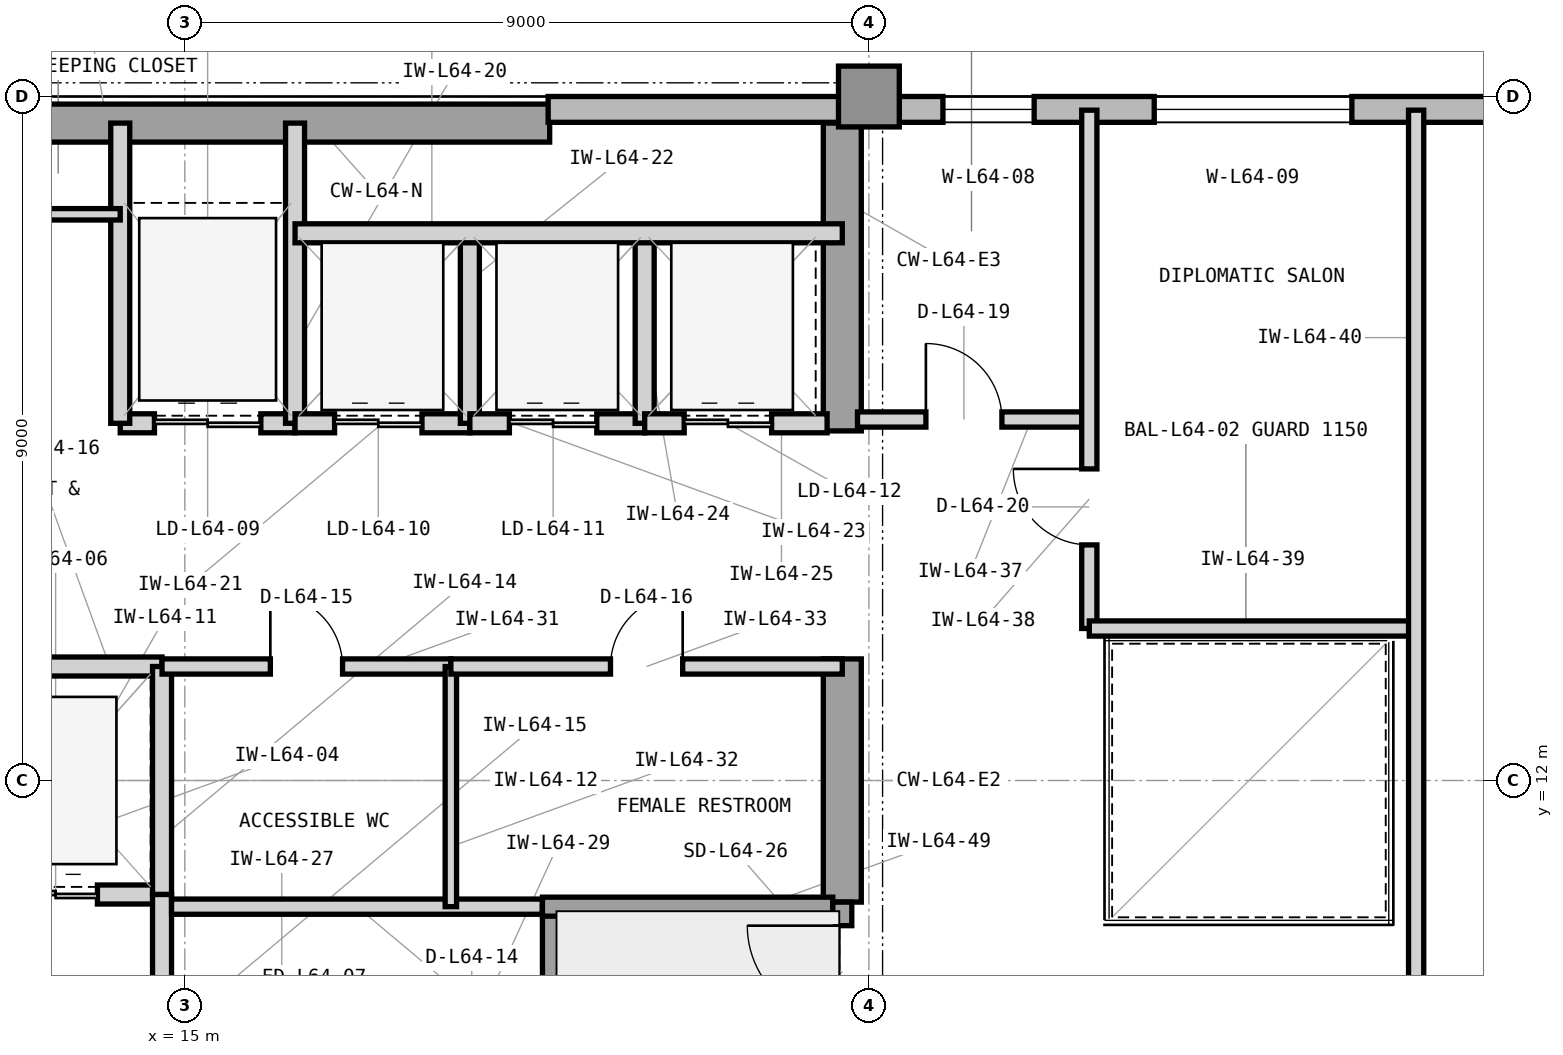
"""IFC4 building model, lengths in metres.
Left out: names, types, materials, properties, quantities, classifications, styles, units other than length and angle.
Written with IfcOpenShell. Run it as: python <this file> out.ifc"""

import sys

from ifc_helpers import new_model, si_unit, direction, frame, frame_2d, origin, origin_2d, place, context, subcontext, project, spatial, rectangle, extrude, element, fill, save


model = new_model("IFC4")
c1 = context("Model", 3, precision=1e-05, world=origin(), true_north=direction((0.0, 1.0)))
c2 = subcontext(c1, "Body", "Model", "MODEL_VIEW")
j1 = project(units=[si_unit("LENGTHUNIT", "METRE"), si_unit("PLANEANGLEUNIT", "RADIAN")], contexts=[c1])
p1 = place(None, origin())
s1 = spatial("IfcSite", under=j1, at=p1, CompositionType="ELEMENT")
p2 = place(p1, origin())
s2 = spatial("IfcBuilding", under=s1, at=p2, CompositionType="ELEMENT")
p3 = place(p2, frame((0.0, 0.0, 262.5)))
s3 = spatial("IfcBuildingStorey", under=s2, at=p3, CompositionType="ELEMENT", Elevation=262.5)
p4 = place(p3, frame((7.475, 20.65, 0.0), z_axis=(0.0, 0.0, 1.0), x_axis=(1.0, 0.0, 0.0)))
e1 = element("IfcWall", 1, at=p4, inside=s3, PredefinedType="SHEAR", context=c2, shape_type="SweptSolid", body=[
    extrude(rectangle(XDim=12.325, YDim=0.5, at=frame_2d((6.163, 0.0))), origin(), (0.0, 0.0, 1.0), 3.9),
])
p5 = place(p3, frame((23.65, 10.4, 0.0), z_axis=(0.0, 0.0, 1.0), x_axis=(0.0, 1.0, 0.0)))
e2 = element("IfcWall", 2, at=p5, inside=s3, PredefinedType="SHEAR", context=c2, shape_type="SweptSolid", body=[
    extrude(rectangle(XDim=3.2, YDim=0.5, at=frame_2d((1.6, 0.0))), origin(), (0.0, 0.0, 1.0), 3.9),
])
p6 = place(p3, frame((23.65, 16.6, 0.0), z_axis=(0.0, 0.0, 1.0), x_axis=(0.0, 1.0, 0.0)))
e3 = element("IfcWall", 3, at=p6, inside=s3, PredefinedType="SHEAR", context=c2, shape_type="SweptSolid", body=[
    extrude(rectangle(XDim=4.05, YDim=0.5, at=frame_2d((2.025, 0.0))), origin(), (0.0, 0.0, 1.0), 3.9),
])
p7 = place(p3, frame((24.0, 21.0, 0.0), z_axis=(0.0, 0.0, 1.0), x_axis=(1.0, 0.0, 0.0)))
e4 = element("IfcColumn", 4, at=p7, inside=s3, PredefinedType="COLUMN", context=c2, shape_type="SweptSolid", body=[
    extrude(rectangle(XDim=0.8, YDim=0.8, at=origin_2d()), origin(), (0.0, 0.0, 1.0), 3.9),
])
p8 = place(p3, frame((52.4, 20.83, 0.0), z_axis=(0.0, 0.0, 1.0), x_axis=(-1.0, 0.0, 0.0)))
e5 = element("IfcWall", 5, at=p8, inside=s3, PredefinedType="STANDARD", context=c2, shape_type="SweptSolid", body=[
    extrude(rectangle(XDim=32.62, YDim=0.34, at=frame_2d((16.31, 0.0))), origin(), (0.0, 0.0, 1.0), 3.715),
])
p9 = place(p8, frame((5.69, 0.0, 0.8)))
e6 = element("IfcOpeningElement", 6, at=p9, cuts=e5, PredefinedType="OPENING", context=c2, shape_type="SweptSolid", body=[
    extrude(rectangle(XDim=2.6, YDim=2.35, at=frame_2d((1.3, 1.175))), frame((0.0, 0.18, 0.0), z_axis=(0.0, -1.0, 0.0), x_axis=(1.0, 0.0, 0.0)), (0.0, 0.0, 1.0), 0.36),
])
p10 = place(p8, frame((15.01, 0.0, 0.8)))
e7 = element("IfcOpeningElement", 7, at=p10, cuts=e5, PredefinedType="OPENING", context=c2, shape_type="SweptSolid", body=[
    extrude(rectangle(XDim=2.6, YDim=2.35, at=frame_2d((1.3, 1.175))), frame((0.0, 0.18, 0.0), z_axis=(0.0, -1.0, 0.0), x_axis=(1.0, 0.0, 0.0)), (0.0, 0.0, 1.0), 0.36),
])
p11 = place(p8, frame((26.226, 0.0, 0.8)))
e8 = element("IfcOpeningElement", 8, at=p11, cuts=e5, PredefinedType="OPENING", context=c2, shape_type="SweptSolid", body=[
    extrude(rectangle(XDim=1.2, YDim=2.35, at=frame_2d((0.6, 1.175))), frame((0.0, 0.18, 0.0), z_axis=(0.0, -1.0, 0.0), x_axis=(1.0, 0.0, 0.0)), (0.0, 0.0, 1.0), 0.36),
])
p12 = place(p8, frame((22.046, 0.0, 0.8)))
e9 = element("IfcOpeningElement", 9, at=p12, cuts=e5, PredefinedType="OPENING", context=c2, shape_type="SweptSolid", body=[
    extrude(rectangle(XDim=2.6, YDim=2.35, at=frame_2d((1.3, 1.175))), frame((0.0, 0.18, 0.0), z_axis=(0.0, -1.0, 0.0), x_axis=(1.0, 0.0, 0.0)), (0.0, 0.0, 1.0), 0.36),
])
p13 = place(p3, frame((11.95, 10.5, 0.0), z_axis=(0.0, 0.0, 1.0), x_axis=(1.0, 0.0, 0.0)))
e10 = element("IfcWall", 10, at=p13, inside=s3, PredefinedType="PARTITIONING", context=c2, shape_type="SweptSolid", body=[
    extrude(rectangle(XDim=2.75, YDim=0.25, at=frame_2d((1.375, 0.0))), origin(), (0.0, 0.0, 1.0), 3.088),
])
p14 = place(p13, frame((0.8, 0.0, 0.0)))
e11 = element("IfcOpeningElement", 11, at=p14, cuts=e10, PredefinedType="OPENING", context=c2, shape_type="SweptSolid", body=[
    extrude(rectangle(XDim=1.1, YDim=2.25, at=frame_2d((0.55, 1.125))), frame((0.0, 0.135, 0.0), z_axis=(0.0, -1.0, 0.0), x_axis=(1.0, 0.0, 0.0)), (0.0, 0.0, 1.0), 0.27),
])
p15 = place(p3, frame((11.95, 13.5, 0.0), z_axis=(0.0, 0.0, 1.0), x_axis=(1.0, 0.0, 0.0)))
e12 = element("IfcWall", 12, at=p15, inside=s3, PredefinedType="PARTITIONING", context=c2, shape_type="SweptSolid", body=[
    extrude(rectangle(XDim=2.75, YDim=0.25, at=frame_2d((1.375, 0.0))), origin(), (0.0, 0.0, 1.0), 3.088),
])
p16 = place(p3, frame((14.7, 10.5, 0.0), z_axis=(0.0, 0.0, 1.0), x_axis=(0.0, 1.0, 0.0)))
e13 = element("IfcWall", 13, at=p16, inside=s3, PredefinedType="PARTITIONING", context=c2, shape_type="SweptSolid", body=[
    extrude(rectangle(XDim=3.0, YDim=0.25, at=frame_2d((1.5, 0.0))), origin(), (0.0, 0.0, 1.0), 3.705),
])
p17 = place(p3, frame((14.7, 6.7, 0.0), z_axis=(0.0, 0.0, 1.0), x_axis=(0.0, 1.0, 0.0)))
e14 = element("IfcWall", 14, at=p17, inside=s3, PredefinedType="PARTITIONING", context=c2, shape_type="SweptSolid", body=[
    extrude(rectangle(XDim=3.8, YDim=0.25, at=frame_2d((1.9, 0.0))), origin(), (0.0, 0.0, 1.0), 3.705),
])
p18 = place(p17, frame((1.3, 0.0, 0.0)))
e15 = element("IfcOpeningElement", 15, at=p18, cuts=e14, PredefinedType="OPENING", context=c2, shape_type="SweptSolid", body=[
    extrude(rectangle(XDim=1.2, YDim=2.2, at=frame_2d((0.6, 1.1))), frame((0.0, 0.135, 0.0), z_axis=(0.0, -1.0, 0.0), x_axis=(1.0, 0.0, 0.0)), (0.0, 0.0, 1.0), 0.27),
])
p19 = place(p3, frame((14.15, 16.7, 0.0), z_axis=(0.0, 0.0, 1.0), x_axis=(1.0, 0.0, 0.0)))
e16 = element("IfcWall", 16, at=p19, inside=s3, PredefinedType="PARTITIONING", context=c2, shape_type="SweptSolid", body=[
    extrude(rectangle(XDim=2.3, YDim=0.25, at=frame_2d((1.15, 0.0))), origin(), (0.0, 0.0, 1.0), 3.088),
])
p20 = place(p19, frame((0.45, 0.0, 0.0)))
e17 = element("IfcOpeningElement", 17, at=p20, cuts=e16, PredefinedType="OPENING", context=c2, shape_type="SweptSolid", body=[
    extrude(rectangle(XDim=1.4, YDim=2.35, at=frame_2d((0.7, 1.175))), frame((0.0, 0.135, 0.0), z_axis=(0.0, -1.0, 0.0), x_axis=(1.0, 0.0, 0.0)), (0.0, 0.0, 1.0), 0.27),
])
for number, where, z_axis, x_axis in (
    (18, (14.15, 16.7, 0.0), (0.0, 0.0, 1.0), (0.0, 1.0, 0.0)),
    (19, (16.45, 16.7, 0.0), (0.0, 0.0, 1.0), (0.0, 1.0, 0.0)),
):
    element("IfcWall", number, at=place(p3, frame(where, z_axis=z_axis, x_axis=x_axis)), inside=s3, PredefinedType="PARTITIONING", context=c2, shape_type="SweptSolid", body=[
        extrude(rectangle(XDim=3.95, YDim=0.25, at=frame_2d((1.975, 0.0))), origin(), (0.0, 0.0, 1.0), 3.705),
    ])
p21 = place(p3, frame((16.45, 16.7, 0.0), z_axis=(0.0, 0.0, 1.0), x_axis=(1.0, 0.0, 0.0)))
e20 = element("IfcWall", 20, at=p21, inside=s3, PredefinedType="PARTITIONING", context=c2, shape_type="SweptSolid", body=[
    extrude(rectangle(XDim=2.3, YDim=0.25, at=frame_2d((1.15, 0.0))), origin(), (0.0, 0.0, 1.0), 3.088),
])
p22 = place(p21, frame((0.52, 0.0, 0.0)))
e21 = element("IfcOpeningElement", 21, at=p22, cuts=e20, PredefinedType="OPENING", context=c2, shape_type="SweptSolid", body=[
    extrude(rectangle(XDim=1.15, YDim=2.25, at=frame_2d((0.575, 1.125))), frame((0.0, 0.135, 0.0), z_axis=(0.0, -1.0, 0.0), x_axis=(1.0, 0.0, 0.0)), (0.0, 0.0, 1.0), 0.27),
])
p23 = place(p3, frame((18.75, 16.7, 0.0), z_axis=(0.0, 0.0, 1.0), x_axis=(0.0, 1.0, 0.0)))
e22 = element("IfcWall", 22, at=p23, inside=s3, PredefinedType="PARTITIONING", context=c2, shape_type="SweptSolid", body=[
    extrude(rectangle(XDim=2.5, YDim=0.25, at=frame_2d((1.25, 0.0))), origin(), (0.0, 0.0, 1.0), 3.705),
])
p24 = place(p3, frame((18.75, 16.7, 0.0), z_axis=(0.0, 0.0, 1.0), x_axis=(1.0, 0.0, 0.0)))
e23 = element("IfcWall", 23, at=p24, inside=s3, PredefinedType="PARTITIONING", context=c2, shape_type="SweptSolid", body=[
    extrude(rectangle(XDim=2.3, YDim=0.25, at=frame_2d((1.15, 0.0))), origin(), (0.0, 0.0, 1.0), 3.088),
])
p25 = place(p24, frame((0.52, 0.0, 0.0)))
e24 = element("IfcOpeningElement", 24, at=p25, cuts=e23, PredefinedType="OPENING", context=c2, shape_type="SweptSolid", body=[
    extrude(rectangle(XDim=1.15, YDim=2.25, at=frame_2d((0.575, 1.125))), frame((0.0, 0.135, 0.0), z_axis=(0.0, -1.0, 0.0), x_axis=(1.0, 0.0, 0.0)), (0.0, 0.0, 1.0), 0.27),
])
p26 = place(p3, frame((21.05, 16.7, 0.0), z_axis=(0.0, 0.0, 1.0), x_axis=(0.0, 1.0, 0.0)))
e25 = element("IfcWall", 25, at=p26, inside=s3, PredefinedType="PARTITIONING", context=c2, shape_type="SweptSolid", body=[
    extrude(rectangle(XDim=2.5, YDim=0.25, at=frame_2d((1.25, 0.0))), origin(), (0.0, 0.0, 1.0), 3.705),
])
p27 = place(p3, frame((21.05, 16.7, 0.0), z_axis=(0.0, 0.0, 1.0), x_axis=(1.0, 0.0, 0.0)))
e26 = element("IfcWall", 26, at=p27, inside=s3, PredefinedType="PARTITIONING", context=c2, shape_type="SweptSolid", body=[
    extrude(rectangle(XDim=2.4, YDim=0.25, at=frame_2d((1.2, 0.0))), origin(), (0.0, 0.0, 1.0), 3.088),
])
p28 = place(p27, frame((0.52, 0.0, 0.0)))
e27 = element("IfcOpeningElement", 27, at=p28, cuts=e26, PredefinedType="OPENING", context=c2, shape_type="SweptSolid", body=[
    extrude(rectangle(XDim=1.15, YDim=2.25, at=frame_2d((0.575, 1.125))), frame((0.0, 0.135, 0.0), z_axis=(0.0, -1.0, 0.0), x_axis=(1.0, 0.0, 0.0)), (0.0, 0.0, 1.0), 0.27),
])
p29 = place(p3, frame((16.45, 19.2, 0.0), z_axis=(0.0, 0.0, 1.0), x_axis=(1.0, 0.0, 0.0)))
e28 = element("IfcWall", 28, at=p29, inside=s3, PredefinedType="PARTITIONING", context=c2, shape_type="SweptSolid", body=[
    extrude(rectangle(XDim=7.2, YDim=0.25, at=frame_2d((3.6, 0.0))), origin(), (0.0, 0.0, 1.0), 3.705),
])
p30 = place(p3, frame((14.825, 10.34, 0.0), z_axis=(0.0, 0.0, 1.0), x_axis=(1.0, 0.0, 0.0)))
e29 = element("IfcWall", 29, at=p30, inside=s3, PredefinedType="PARTITIONING", context=c2, shape_type="SweptSolid", body=[
    extrude(rectangle(XDim=4.88, YDim=0.2, at=frame_2d((2.44, 0.0))), origin(), (0.0, 0.0, 1.0), 3.088),
])
p31 = place(p3, frame((14.7, 13.5, 0.0), z_axis=(0.0, 0.0, 1.0), x_axis=(1.0, 0.0, 0.0)))
e30 = element("IfcWall", 30, at=p31, inside=s3, PredefinedType="PARTITIONING", context=c2, shape_type="SweptSolid", body=[
    extrude(rectangle(XDim=3.8, YDim=0.2, at=frame_2d((1.9, 0.0))), origin(), (0.0, 0.0, 1.0), 3.088),
])
p32 = place(p31, frame((1.425, 0.0, 0.0)))
e31 = element("IfcOpeningElement", 31, at=p32, cuts=e30, PredefinedType="OPENING", context=c2, shape_type="SweptSolid", body=[
    extrude(rectangle(XDim=0.95, YDim=2.1, at=frame_2d((0.475, 1.05))), frame((0.0, 0.11, 0.0), z_axis=(0.0, -1.0, 0.0), x_axis=(1.0, 0.0, 0.0)), (0.0, 0.0, 1.0), 0.22),
])
p33 = place(p3, frame((18.5, 10.34, 0.0), z_axis=(0.0, 0.0, 1.0), x_axis=(0.0, 1.0, 0.0)))
e32 = element("IfcWall", 32, at=p33, inside=s3, PredefinedType="PARTITIONING", context=c2, shape_type="SweptSolid", body=[
    extrude(rectangle(XDim=3.16, YDim=0.15, at=frame_2d((1.58, 0.0))), origin(), (0.0, 0.0, 1.0), 3.705),
])
p34 = place(p3, frame((18.5, 13.5, 0.0), z_axis=(0.0, 0.0, 1.0), x_axis=(1.0, 0.0, 0.0)))
e33 = element("IfcWall", 33, at=p34, inside=s3, PredefinedType="PARTITIONING", context=c2, shape_type="SweptSolid", body=[
    extrude(rectangle(XDim=5.15, YDim=0.2, at=frame_2d((2.575, 0.0))), origin(), (0.0, 0.0, 1.0), 3.088),
])
p35 = place(p34, frame((2.1, 0.0, 0.0)))
e34 = element("IfcOpeningElement", 34, at=p35, cuts=e33, PredefinedType="OPENING", context=c2, shape_type="SweptSolid", body=[
    extrude(rectangle(XDim=0.95, YDim=2.1, at=frame_2d((0.475, 1.05))), frame((0.0, 0.11, 0.0), z_axis=(0.0, -1.0, 0.0), x_axis=(1.0, 0.0, 0.0)), (0.0, 0.0, 1.0), 0.22),
])
p36 = place(p3, frame((10.33, 19.45, 0.0), z_axis=(0.0, 0.0, 1.0), x_axis=(1.0, 0.0, 0.0)))
e35 = element("IfcWall", 35, at=p36, inside=s3, PredefinedType="PARTITIONING", context=c2, shape_type="SweptSolid", body=[
    extrude(rectangle(XDim=3.82, YDim=0.15, at=frame_2d((1.91, 0.0))), origin(), (0.0, 0.0, 1.0), 3.705),
])
p37 = place(p36, frame((1.25, 0.0, 0.0)))
e36 = element("IfcOpeningElement", 36, at=p37, cuts=e35, PredefinedType="OPENING", context=c2, shape_type="SweptSolid", body=[
    extrude(rectangle(XDim=0.95, YDim=2.1, at=frame_2d((0.475, 1.05))), frame((0.0, 0.085, 0.0), z_axis=(0.0, -1.0, 0.0), x_axis=(1.0, 0.0, 0.0)), (0.0, 0.0, 1.0), 0.17),
])
p38 = place(p3, frame((23.85, 16.75, 0.0), z_axis=(0.0, 0.0, 1.0), x_axis=(1.0, 0.0, 0.0)))
e37 = element("IfcWall", 37, at=p38, inside=s3, PredefinedType="PARTITIONING", context=c2, shape_type="SweptSolid", body=[
    extrude(rectangle(XDim=3.05, YDim=0.2, at=frame_2d((1.525, 0.0))), origin(), (0.0, 0.0, 1.0), 3.705),
])
p39 = place(p38, frame((0.9, 0.0, 0.0)))
e38 = element("IfcOpeningElement", 38, at=p39, cuts=e37, PredefinedType="OPENING", context=c2, shape_type="SweptSolid", body=[
    extrude(rectangle(XDim=1.0, YDim=2.15, at=frame_2d((0.5, 1.075))), frame((0.0, 0.11, 0.0), z_axis=(0.0, -1.0, 0.0), x_axis=(1.0, 0.0, 0.0)), (0.0, 0.0, 1.0), 0.22),
])
p40 = place(p3, frame((26.9, 14.0, 0.0), z_axis=(0.0, 0.0, 1.0), x_axis=(0.0, 1.0, 0.0)))
e39 = element("IfcWall", 39, at=p40, inside=s3, PredefinedType="PARTITIONING", context=c2, shape_type="SweptSolid", body=[
    extrude(rectangle(XDim=6.82, YDim=0.2, at=frame_2d((3.41, 0.0))), origin(), (0.0, 0.0, 1.0), 3.705),
])
p41 = place(p40, frame((1.1, 0.0, 0.0)))
e40 = element("IfcOpeningElement", 40, at=p41, cuts=e39, PredefinedType="OPENING", context=c2, shape_type="SweptSolid", body=[
    extrude(rectangle(XDim=1.0, YDim=2.15, at=frame_2d((0.5, 1.075))), frame((0.0, 0.11, 0.0), z_axis=(0.0, -1.0, 0.0), x_axis=(1.0, 0.0, 0.0)), (0.0, 0.0, 1.0), 0.22),
])
p42 = place(p3, frame((26.9, 14.0, 0.0), z_axis=(0.0, 0.0, 1.0), x_axis=(1.0, 0.0, 0.0)))
e41 = element("IfcWall", 41, at=p42, inside=s3, PredefinedType="PARTITIONING", context=c2, shape_type="SweptSolid", body=[
    extrude(rectangle(XDim=4.3, YDim=0.2, at=frame_2d((2.15, 0.0))), origin(), (0.0, 0.0, 1.0), 3.705),
])
p43 = place(p3, frame((31.2, 8.85, 0.0), z_axis=(0.0, 0.0, 1.0), x_axis=(0.0, 1.0, 0.0)))
e42 = element("IfcWall", 42, at=p43, inside=s3, PredefinedType="PARTITIONING", context=c2, shape_type="SweptSolid", body=[
    extrude(rectangle(XDim=11.97, YDim=0.2, at=frame_2d((5.985, 0.0))), origin(), (0.0, 0.0, 1.0), 3.705),
])
p44 = place(p3, frame((19.83, 3.6, 0.0), z_axis=(0.0, 0.0, 1.0), x_axis=(0.0, 1.0, 0.0)))
e43 = element("IfcWall", 43, at=p44, inside=s3, PredefinedType="SHEAR", context=c2, shape_type="SweptSolid", body=[
    extrude(rectangle(XDim=6.74, YDim=0.25, at=frame_2d((3.37, 0.0))), origin(), (0.0, 0.0, 1.0), 3.9),
])
p45 = place(p3, frame((19.705, 10.34, 0.0), z_axis=(0.0, 0.0, 1.0), x_axis=(1.0, 0.0, 0.0)))
e44 = element("IfcWall", 44, at=p45, inside=s3, PredefinedType="SHEAR", context=c2, shape_type="SweptSolid", body=[
    extrude(rectangle(XDim=3.82, YDim=0.25, at=frame_2d((1.91, 0.0))), origin(), (0.0, 0.0, 1.0), 3.9),
])
p46 = place(p3, frame((23.65, 6.8, 0.0), z_axis=(0.0, 0.0, 1.0), x_axis=(0.0, 1.0, 0.0)))
e45 = element("IfcWall", 45, at=p46, inside=s3, PredefinedType="SHEAR", context=c2, shape_type="SweptSolid", body=[
    extrude(rectangle(XDim=3.6, YDim=0.25, at=frame_2d((1.8, 0.0))), origin(), (0.0, 0.0, 1.0), 3.9),
])
p47 = place(p46, frame((2.04, 0.0, 0.0)))
e46 = element("IfcOpeningElement", 46, at=p47, cuts=e45, PredefinedType="OPENING", context=c2, shape_type="SweptSolid", body=[
    extrude(rectangle(XDim=1.25, YDim=2.2, at=frame_2d((0.625, 1.1))), frame((0.0, 0.135, 0.0), z_axis=(0.0, -1.0, 0.0), x_axis=(1.0, 0.0, 0.0)), (0.0, 0.0, 1.0), 0.27),
])
p48 = place(p14, origin())
e47 = element("IfcDoor", 47, at=p48, inside=s3, OperationType="DOUBLE_DOOR_SLIDING", PredefinedType="DOOR", context=c2, shape_type="SweptSolid", body=[
    extrude(rectangle(XDim=1.1, YDim=2.25, at=frame_2d((0.55, 1.125))), frame((0.0, 0.025, 0.0), z_axis=(0.0, -1.0, 0.0), x_axis=(1.0, 0.0, 0.0)), (0.0, 0.0, 1.0), 0.05),
])
fill(e11, e47)
p49 = place(p20, origin())
e48 = element("IfcDoor", 48, at=p49, inside=s3, OperationType="DOUBLE_DOOR_SLIDING", PredefinedType="DOOR", context=c2, shape_type="SweptSolid", body=[
    extrude(rectangle(XDim=1.4, YDim=2.35, at=frame_2d((0.7, 1.175))), frame((0.0, 0.025, 0.0), z_axis=(0.0, -1.0, 0.0), x_axis=(1.0, 0.0, 0.0)), (0.0, 0.0, 1.0), 0.05),
])
fill(e17, e48)
p50 = place(p22, origin())
e49 = element("IfcDoor", 49, at=p50, inside=s3, OperationType="DOUBLE_DOOR_SLIDING", PredefinedType="DOOR", context=c2, shape_type="SweptSolid", body=[
    extrude(rectangle(XDim=1.15, YDim=2.25, at=frame_2d((0.575, 1.125))), frame((0.0, 0.025, 0.0), z_axis=(0.0, -1.0, 0.0), x_axis=(1.0, 0.0, 0.0)), (0.0, 0.0, 1.0), 0.05),
])
fill(e21, e49)
p51 = place(p25, origin())
e50 = element("IfcDoor", 50, at=p51, inside=s3, OperationType="DOUBLE_DOOR_SLIDING", PredefinedType="DOOR", context=c2, shape_type="SweptSolid", body=[
    extrude(rectangle(XDim=1.15, YDim=2.25, at=frame_2d((0.575, 1.125))), frame((0.0, 0.025, 0.0), z_axis=(0.0, -1.0, 0.0), x_axis=(1.0, 0.0, 0.0)), (0.0, 0.0, 1.0), 0.05),
])
fill(e24, e50)
p52 = place(p28, origin())
e51 = element("IfcDoor", 51, at=p52, inside=s3, OperationType="DOUBLE_DOOR_SLIDING", PredefinedType="DOOR", context=c2, shape_type="SweptSolid", body=[
    extrude(rectangle(XDim=1.15, YDim=2.25, at=frame_2d((0.575, 1.125))), frame((0.0, 0.025, 0.0), z_axis=(0.0, -1.0, 0.0), x_axis=(1.0, 0.0, 0.0)), (0.0, 0.0, 1.0), 0.05),
])
fill(e27, e51)
p53 = place(p32, origin())
e52 = element("IfcDoor", 52, at=p53, inside=s3, OperationType="SINGLE_SWING_LEFT", PredefinedType="DOOR", context=c2, shape_type="SweptSolid", body=[
    extrude(rectangle(XDim=0.95, YDim=2.1, at=frame_2d((0.475, 1.05))), frame((0.0, 0.025, 0.0), z_axis=(0.0, -1.0, 0.0), x_axis=(1.0, 0.0, 0.0)), (0.0, 0.0, 1.0), 0.05),
])
fill(e31, e52)
p54 = place(p35, origin())
e53 = element("IfcDoor", 53, at=p54, inside=s3, OperationType="SINGLE_SWING_RIGHT", PredefinedType="DOOR", context=c2, shape_type="SweptSolid", body=[
    extrude(rectangle(XDim=0.95, YDim=2.1, at=frame_2d((0.475, 1.05))), frame((0.0, 0.025, 0.0), z_axis=(0.0, -1.0, 0.0), x_axis=(1.0, 0.0, 0.0)), (0.0, 0.0, 1.0), 0.05),
])
fill(e34, e53)
p55 = place(p39, origin())
e54 = element("IfcDoor", 54, at=p55, inside=s3, OperationType="SINGLE_SWING_LEFT", PredefinedType="DOOR", context=c2, shape_type="SweptSolid", body=[
    extrude(rectangle(XDim=1.0, YDim=2.15, at=frame_2d((0.5, 1.075))), frame((0.0, 0.025, 0.0), z_axis=(0.0, -1.0, 0.0), x_axis=(1.0, 0.0, 0.0)), (0.0, 0.0, 1.0), 0.05),
])
fill(e38, e54)
p56 = place(p41, origin())
e55 = element("IfcDoor", 55, at=p56, inside=s3, OperationType="SINGLE_SWING_RIGHT", PredefinedType="DOOR", context=c2, shape_type="SweptSolid", body=[
    extrude(rectangle(XDim=1.0, YDim=2.15, at=frame_2d((0.5, 1.075))), frame((0.0, 0.025, 0.0), z_axis=(0.0, -1.0, 0.0), x_axis=(1.0, 0.0, 0.0)), (0.0, 0.0, 1.0), 0.05),
])
fill(e40, e55)
p57 = place(p47, origin())
e56 = element("IfcDoor", 56, at=p57, inside=s3, OperationType="SINGLE_SWING_RIGHT", PredefinedType="DOOR", context=c2, shape_type="SweptSolid", body=[
    extrude(rectangle(XDim=1.25, YDim=2.2, at=frame_2d((0.625, 1.1))), frame((0.0, 0.025, 0.0), z_axis=(0.0, -1.0, 0.0), x_axis=(1.0, 0.0, 0.0)), (0.0, 0.0, 1.0), 0.05),
])
fill(e46, e56)
p58 = place(p11, origin())
e57 = element("IfcWindow", 57, at=p58, inside=s3, PartitioningType="SINGLE_PANEL", PredefinedType="WINDOW", context=c2, shape_type="SweptSolid", body=[
    extrude(rectangle(XDim=1.2, YDim=2.35, at=frame_2d((0.6, 1.175))), frame((0.0, 0.11, 0.0), z_axis=(0.0, -1.0, 0.0), x_axis=(1.0, 0.0, 0.0)), (0.0, 0.0, 1.0), 0.06),
])
fill(e8, e57)
p59 = place(p12, origin())
e58 = element("IfcWindow", 58, at=p59, inside=s3, PartitioningType="SINGLE_PANEL", PredefinedType="WINDOW", context=c2, shape_type="SweptSolid", body=[
    extrude(rectangle(XDim=2.6, YDim=2.35, at=frame_2d((1.3, 1.175))), frame((0.0, 0.11, 0.0), z_axis=(0.0, -1.0, 0.0), x_axis=(1.0, 0.0, 0.0)), (0.0, 0.0, 1.0), 0.06),
])
fill(e9, e58)
save(model, sys.argv[1])
